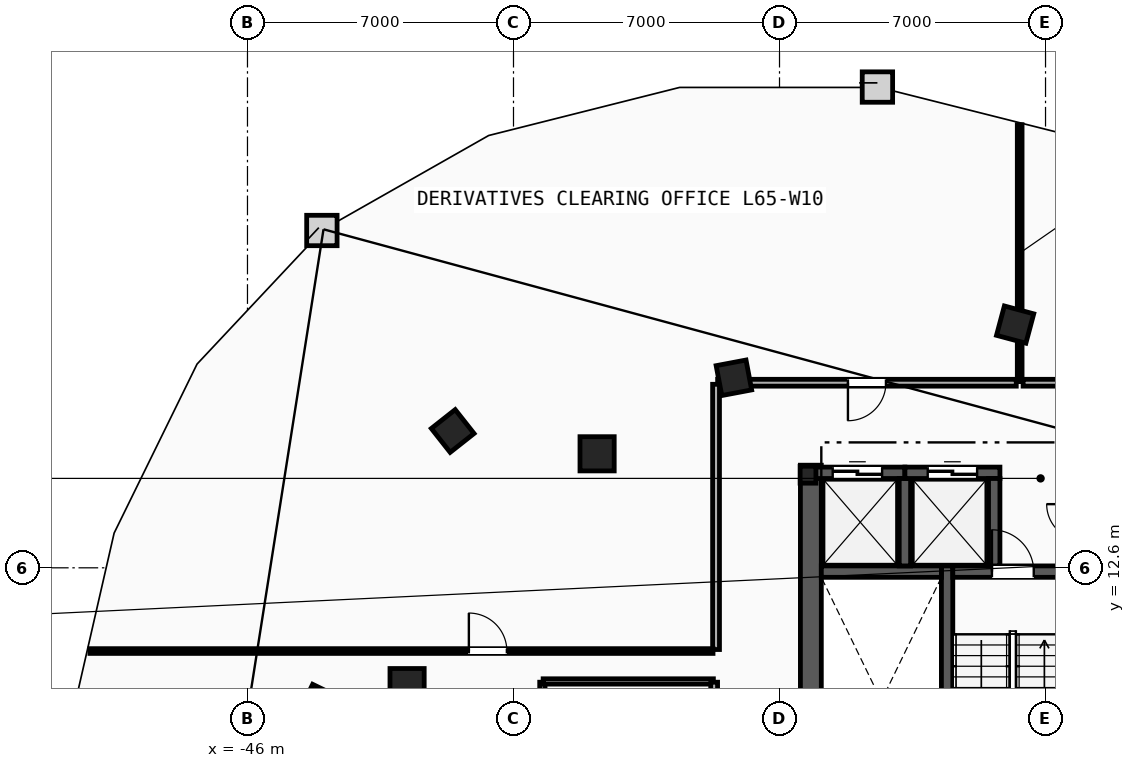
"""IFC4 building model, lengths in metres.
Left out: names, types, materials, properties, quantities, classifications, styles, units other than length and angle.
Written with IfcOpenShell. Run it as: python <this file> out.ifc"""

import sys

from ifc_helpers import new_model, si_unit, direction, frame, frame_2d, origin, origin_2d, place, context, subcontext, project, spatial, rectangle, i_section, extrude, element, fill, save


model = new_model("IFC4")
c1 = context("Model", 3, precision=1e-05, world=origin(), true_north=direction((0.0, 1.0)))
c2 = subcontext(c1, "Body", "Model", "MODEL_VIEW")
j1 = project(units=[si_unit("LENGTHUNIT", "METRE"), si_unit("PLANEANGLEUNIT", "RADIAN")], contexts=[c1])
p1 = place(None, origin())
s1 = spatial("IfcSite", under=j1, at=p1, CompositionType="ELEMENT")
p2 = place(p1, origin())
s2 = spatial("IfcBuilding", under=s1, at=p2, CompositionType="ELEMENT")
p3 = place(p2, frame((0.0, 0.0, 246.8)))
s3 = spatial("IfcBuildingStorey", under=s2, at=p3, CompositionType="ELEMENT", Elevation=246.8)
p4 = place(p3, frame((-31.25, 15.05, 0.0), z_axis=(0.0, 0.0, 1.0), x_axis=(1.0, 0.0, 0.0)))
e1 = element("IfcColumn", 1, at=p4, inside=s3, PredefinedType="COLUMN", context=c2, shape_type="SweptSolid", body=[
    extrude(i_section(OverallWidth=0.416, OverallDepth=0.446, WebThickness=0.039, FlangeThickness=0.063, FilletRadius=0.018, at=origin_2d()), origin(), (0.0, 0.0, 1.0), 3.6),
])
for number, where, z_axis, x_axis in (
    (2, (-41.8, 9.5, 0.0), (0.0, 0.0, 1.0), (1.0, 0.0, 0.0)),
    (3, (-36.8, 15.6, 0.0), (0.0, 0.0, 1.0), (1.0, 0.0, 0.0)),
):
    element("IfcColumn", number, at=place(p3, frame(where, z_axis=z_axis, x_axis=x_axis)), inside=s3, PredefinedType="COLUMN", context=c2, shape_type="SweptSolid", body=[
        extrude(rectangle(XDim=0.9, YDim=0.9, at=origin_2d()), origin(), (0.0, 0.0, 1.0), 3.6),
    ])
for number, where, z_axis, x_axis in (
    (4, (-25.8, 19.0, 0.0), (0.0, 0.0, 1.0), (-0.966, 0.259, 0.0)),
    (5, (-33.2, 17.6, 0.0), (0.0, 0.0, 1.0), (-0.983, -0.186, 0.0)),
    (6, (-40.6, 16.2, 0.0), (0.0, 0.0, 1.0), (-0.785, -0.619, 0.0)),
    (7, (-44.1, 9.0, 0.0), (0.0, 0.0, 1.0), (-0.437, -0.899, 0.0)),
):
    element("IfcColumn", number, at=place(p3, frame(where, z_axis=z_axis, x_axis=x_axis)), inside=s3, PredefinedType="COLUMN", context=c2, shape_type="SweptSolid", body=[
        extrude(rectangle(XDim=0.8, YDim=0.8, at=origin_2d()), origin(), (0.0, 0.0, 1.0), 3.6),
    ])
p5 = place(p3, frame((-31.175, 1.97, 0.0), z_axis=(0.0, 0.0, 1.0), x_axis=(0.0, 1.0, 0.0)))
e8 = element("IfcWall", 8, at=p5, inside=s3, PredefinedType="SHEAR", context=c2, shape_type="SweptSolid", body=[
    extrude(rectangle(XDim=13.33, YDim=0.55, at=frame_2d((6.665, 0.0))), origin(), (0.0, 0.0, 1.0), 3.34),
])
p6 = place(p3, frame((-27.59, 1.97, 0.0), z_axis=(0.0, 0.0, 1.0), x_axis=(0.0, 1.0, 0.0)))
e9 = element("IfcWall", 9, at=p6, inside=s3, PredefinedType="SHEAR", context=c2, shape_type="SweptSolid", body=[
    extrude(rectangle(XDim=10.68, YDim=0.3, at=frame_2d((5.34, 0.0))), origin(), (0.0, 0.0, 1.0), 3.34),
])
p7 = place(p3, frame((-30.9, 12.5, 0.0), z_axis=(0.0, 0.0, 1.0), x_axis=(1.0, 0.0, 0.0)))
e10 = element("IfcWall", 10, at=p7, inside=s3, PredefinedType="SHEAR", context=c2, shape_type="SweptSolid", body=[
    extrude(rectangle(XDim=3.16, YDim=0.3, at=frame_2d((1.58, 0.0))), origin(), (0.0, 0.0, 1.0), 3.34),
])
p8 = place(p3, frame((-27.44, 12.5, 0.0), z_axis=(0.0, 0.0, 1.0), x_axis=(1.0, 0.0, 0.0)))
e11 = element("IfcWall", 11, at=p8, inside=s3, PredefinedType="SHEAR", context=c2, shape_type="SweptSolid", body=[
    extrude(rectangle(XDim=3.16, YDim=0.3, at=frame_2d((1.58, 0.0))), origin(), (0.0, 0.0, 1.0), 3.34),
])
p9 = place(p8, frame((1.03, 0.0, 0.0)))
e12 = element("IfcOpeningElement", 12, at=p9, cuts=e11, PredefinedType="OPENING", context=c2, shape_type="SweptSolid", body=[
    extrude(rectangle(XDim=1.1, YDim=2.15, at=frame_2d((0.55, 1.075))), frame((0.0, 0.16, 0.0), z_axis=(0.0, -1.0, 0.0), x_axis=(1.0, 0.0, 0.0)), (0.0, 0.0, 1.0), 0.32),
])
p10 = place(p3, frame((-31.2, 15.1, 0.0), z_axis=(0.0, 0.0, 1.0), x_axis=(1.0, 0.0, 0.0)))
e13 = element("IfcWall", 13, at=p10, inside=s3, PredefinedType="SHEAR", context=c2, shape_type="SweptSolid", body=[
    extrude(rectangle(XDim=2.5, YDim=0.3, at=frame_2d((1.25, 0.0))), origin(), (0.0, 0.0, 1.0), 3.34),
])
p11 = place(p10, frame((0.6, 0.0, 0.0)))
e14 = element("IfcOpeningElement", 14, at=p11, cuts=e13, PredefinedType="OPENING", context=c2, shape_type="SweptSolid", body=[
    extrude(rectangle(XDim=1.3, YDim=2.2, at=frame_2d((0.65, 1.1))), frame((0.0, 0.16, 0.0), z_axis=(0.0, -1.0, 0.0), x_axis=(1.0, 0.0, 0.0)), (0.0, 0.0, 1.0), 0.32),
])
p12 = place(p3, frame((-28.7, 12.65, 0.0), z_axis=(0.0, 0.0, 1.0), x_axis=(0.0, 1.0, 0.0)))
e15 = element("IfcWall", 15, at=p12, inside=s3, PredefinedType="SHEAR", context=c2, shape_type="SweptSolid", body=[
    extrude(rectangle(XDim=2.3, YDim=0.3, at=frame_2d((1.15, 0.0))), origin(), (0.0, 0.0, 1.0), 3.34),
])
p13 = place(p3, frame((-28.7, 15.1, 0.0), z_axis=(0.0, 0.0, 1.0), x_axis=(1.0, 0.0, 0.0)))
e16 = element("IfcWall", 16, at=p13, inside=s3, PredefinedType="SHEAR", context=c2, shape_type="SweptSolid", body=[
    extrude(rectangle(XDim=2.5, YDim=0.3, at=frame_2d((1.25, 0.0))), origin(), (0.0, 0.0, 1.0), 3.34),
])
p14 = place(p13, frame((0.6, 0.0, 0.0)))
e17 = element("IfcOpeningElement", 17, at=p14, cuts=e16, PredefinedType="OPENING", context=c2, shape_type="SweptSolid", body=[
    extrude(rectangle(XDim=1.3, YDim=2.2, at=frame_2d((0.65, 1.1))), frame((0.0, 0.16, 0.0), z_axis=(0.0, -1.0, 0.0), x_axis=(1.0, 0.0, 0.0)), (0.0, 0.0, 1.0), 0.32),
])
p15 = place(p3, frame((-26.35, 12.65, 0.0), z_axis=(0.0, 0.0, 1.0), x_axis=(0.0, 1.0, 0.0)))
e18 = element("IfcWall", 18, at=p15, inside=s3, PredefinedType="SHEAR", context=c2, shape_type="SweptSolid", body=[
    extrude(rectangle(XDim=2.3, YDim=0.3, at=frame_2d((1.15, 0.0))), origin(), (0.0, 0.0, 1.0), 3.34),
])
p16 = place(p3, frame((-38.24, 5.415, 0.0), z_axis=(0.0, 0.0, 1.0), x_axis=(0.0, 1.0, 0.0)))
e19 = element("IfcWall", 19, at=p16, inside=s3, PredefinedType="PARTITIONING", context=c2, shape_type="SweptSolid", body=[
    extrude(rectangle(XDim=4.175, YDim=0.14, at=frame_2d((2.087, 0.0))), origin(), (0.0, 0.0, 1.0), 3.34),
])
p17 = place(p3, frame((-38.22, 9.61, 0.0), z_axis=(0.0, 0.0, 1.0), x_axis=(1.0, 0.0, 0.0)))
e20 = element("IfcWall", 20, at=p17, inside=s3, PredefinedType="PARTITIONING", context=c2, shape_type="SweptSolid", body=[
    extrude(rectangle(XDim=4.48, YDim=0.14, at=frame_2d((2.24, 0.0))), origin(), (0.0, 0.0, 1.0), 3.34),
])
p18 = place(p3, frame((-33.72, 5.43, 0.0), z_axis=(0.0, 0.0, 1.0), x_axis=(0.0, 1.0, 0.0)))
e21 = element("IfcWall", 21, at=p18, inside=s3, PredefinedType="PARTITIONING", context=c2, shape_type="SweptSolid", body=[
    extrude(rectangle(XDim=4.16, YDim=0.18, at=frame_2d((2.08, 0.0))), origin(), (0.0, 0.0, 1.0), 3.34),
])
p19 = place(p18, frame((1.58, 0.0, 0.0)))
e22 = element("IfcOpeningElement", 22, at=p19, cuts=e21, PredefinedType="OPENING", context=c2, shape_type="SweptSolid", body=[
    extrude(rectangle(XDim=1.0, YDim=2.15, at=frame_2d((0.5, 1.075))), frame((0.0, 0.1, 0.0), z_axis=(0.0, -1.0, 0.0), x_axis=(1.0, 0.0, 0.0)), (0.0, 0.0, 1.0), 0.2),
])
p20 = place(p3, frame((-25.68, 17.5, 0.0), z_axis=(0.0, 0.0, 1.0), x_axis=(0.0, 1.0, 0.0)))
e23 = element("IfcWall", 23, at=p20, inside=s3, PredefinedType="PARTITIONING", context=c2, shape_type="SweptSolid", body=[
    extrude(rectangle(XDim=6.76, YDim=0.125, at=frame_2d((3.38, 0.0))), origin(), (0.0, 0.0, 1.0), 3.34),
])
p21 = place(p3, frame((-21.122, 17.47, 0.0), z_axis=(0.0, 0.0, 1.0), x_axis=(-1.0, 0.0, 0.0)))
e24 = element("IfcWall", 24, at=p21, inside=s3, PredefinedType="PARTITIONING", context=c2, shape_type="SweptSolid", body=[
    extrude(rectangle(XDim=4.469, YDim=0.18, at=frame_2d((2.234, 0.0))), origin(), (0.0, 0.0, 1.0), 3.34),
])
p22 = place(p21, frame((1.734, 0.0, 0.0)))
e25 = element("IfcOpeningElement", 25, at=p22, cuts=e24, PredefinedType="OPENING", context=c2, shape_type="SweptSolid", body=[
    extrude(rectangle(XDim=1.0, YDim=2.15, at=frame_2d((0.5, 1.075))), frame((0.0, 0.1, 0.0), z_axis=(0.0, -1.0, 0.0), x_axis=(1.0, 0.0, 0.0)), (0.0, 0.0, 1.0), 0.2),
])
p23 = place(p3, frame((-25.77, 17.47, 0.0), z_axis=(0.0, 0.0, 1.0), x_axis=(-1.0, 0.0, 0.0)))
e26 = element("IfcWall", 26, at=p23, inside=s3, PredefinedType="PARTITIONING", context=c2, shape_type="SweptSolid", body=[
    extrude(rectangle(XDim=7.858, YDim=0.18, at=frame_2d((3.929, 0.0))), origin(), (0.0, 0.0, 1.0), 3.34),
])
p24 = place(p23, frame((3.429, 0.0, 0.0)))
e27 = element("IfcOpeningElement", 27, at=p24, cuts=e26, PredefinedType="OPENING", context=c2, shape_type="SweptSolid", body=[
    extrude(rectangle(XDim=1.0, YDim=2.15, at=frame_2d((0.5, 1.075))), frame((0.0, 0.1, 0.0), z_axis=(0.0, -1.0, 0.0), x_axis=(1.0, 0.0, 0.0)), (0.0, 0.0, 1.0), 0.2),
])
p25 = place(p3, frame((-33.67, 17.428, 0.0), z_axis=(0.0, 0.0, 1.0), x_axis=(0.0, -1.0, 0.0)))
e28 = element("IfcWall", 28, at=p25, inside=s3, PredefinedType="PARTITIONING", context=c2, shape_type="SweptSolid", body=[
    extrude(rectangle(XDim=6.979, YDim=0.18, at=frame_2d((3.489, 0.0))), origin(), (0.0, 0.0, 1.0), 3.34),
])
p26 = place(p3, frame((-50.146, 10.41, 0.0), z_axis=(0.0, 0.0, 1.0), x_axis=(1.0, 0.0, 0.0)))
e29 = element("IfcWall", 29, at=p26, inside=s3, PredefinedType="PARTITIONING", context=c2, shape_type="SweptSolid", body=[
    extrude(rectangle(XDim=16.396, YDim=0.125, at=frame_2d((8.198, 0.0))), origin(), (0.0, 0.0, 1.0), 3.34),
])
p27 = place(p26, frame((9.971, 0.0, 0.0)))
e30 = element("IfcOpeningElement", 30, at=p27, cuts=e29, PredefinedType="OPENING", context=c2, shape_type="SweptSolid", body=[
    extrude(rectangle(XDim=1.0, YDim=2.15, at=frame_2d((0.5, 1.075))), frame((0.0, 0.073, 0.0), z_axis=(0.0, -1.0, 0.0), x_axis=(1.0, 0.0, 0.0)), (0.0, 0.0, 1.0), 0.145),
])
p28 = place(p9, origin())
e31 = element("IfcDoor", 31, at=p28, inside=s3, OperationType="SINGLE_SWING_LEFT", PredefinedType="DOOR", context=c2, shape_type="SweptSolid", body=[
    extrude(rectangle(XDim=1.1, YDim=2.15, at=frame_2d((0.55, 1.075))), frame((0.0, 0.025, 0.0), z_axis=(0.0, -1.0, 0.0), x_axis=(1.0, 0.0, 0.0)), (0.0, 0.0, 1.0), 0.05),
])
fill(e12, e31)
p29 = place(p11, origin())
e32 = element("IfcDoor", 32, at=p29, inside=s3, OperationType="SLIDING_TO_LEFT", PredefinedType="TRAPDOOR", context=c2, shape_type="SweptSolid", body=[
    extrude(rectangle(XDim=1.3, YDim=2.2, at=frame_2d((0.65, 1.1))), frame((0.0, 0.025, 0.0), z_axis=(0.0, -1.0, 0.0), x_axis=(1.0, 0.0, 0.0)), (0.0, 0.0, 1.0), 0.05),
])
fill(e14, e32)
p30 = place(p14, origin())
e33 = element("IfcDoor", 33, at=p30, inside=s3, OperationType="SLIDING_TO_LEFT", PredefinedType="TRAPDOOR", context=c2, shape_type="SweptSolid", body=[
    extrude(rectangle(XDim=1.3, YDim=2.2, at=frame_2d((0.65, 1.1))), frame((0.0, 0.025, 0.0), z_axis=(0.0, -1.0, 0.0), x_axis=(1.0, 0.0, 0.0)), (0.0, 0.0, 1.0), 0.05),
])
fill(e17, e33)
p31 = place(p27, origin())
e34 = element("IfcDoor", 34, at=p31, inside=s3, OperationType="SINGLE_SWING_LEFT", PredefinedType="DOOR", context=c2, shape_type="SweptSolid", body=[
    extrude(rectangle(XDim=1.0, YDim=2.15, at=frame_2d((0.5, 1.075))), frame((0.0, 0.025, 0.0), z_axis=(0.0, -1.0, 0.0), x_axis=(1.0, 0.0, 0.0)), (0.0, 0.0, 1.0), 0.05),
])
fill(e30, e34)
p32 = place(p24, origin())
e35 = element("IfcDoor", 35, at=p32, inside=s3, OperationType="SINGLE_SWING_RIGHT", PredefinedType="DOOR", context=c2, shape_type="SweptSolid", body=[
    extrude(rectangle(XDim=1.0, YDim=2.15, at=frame_2d((0.5, 1.075))), frame((0.0, 0.025, 0.0), z_axis=(0.0, -1.0, 0.0), x_axis=(1.0, 0.0, 0.0)), (0.0, 0.0, 1.0), 0.05),
])
fill(e27, e35)
save(model, sys.argv[1])
